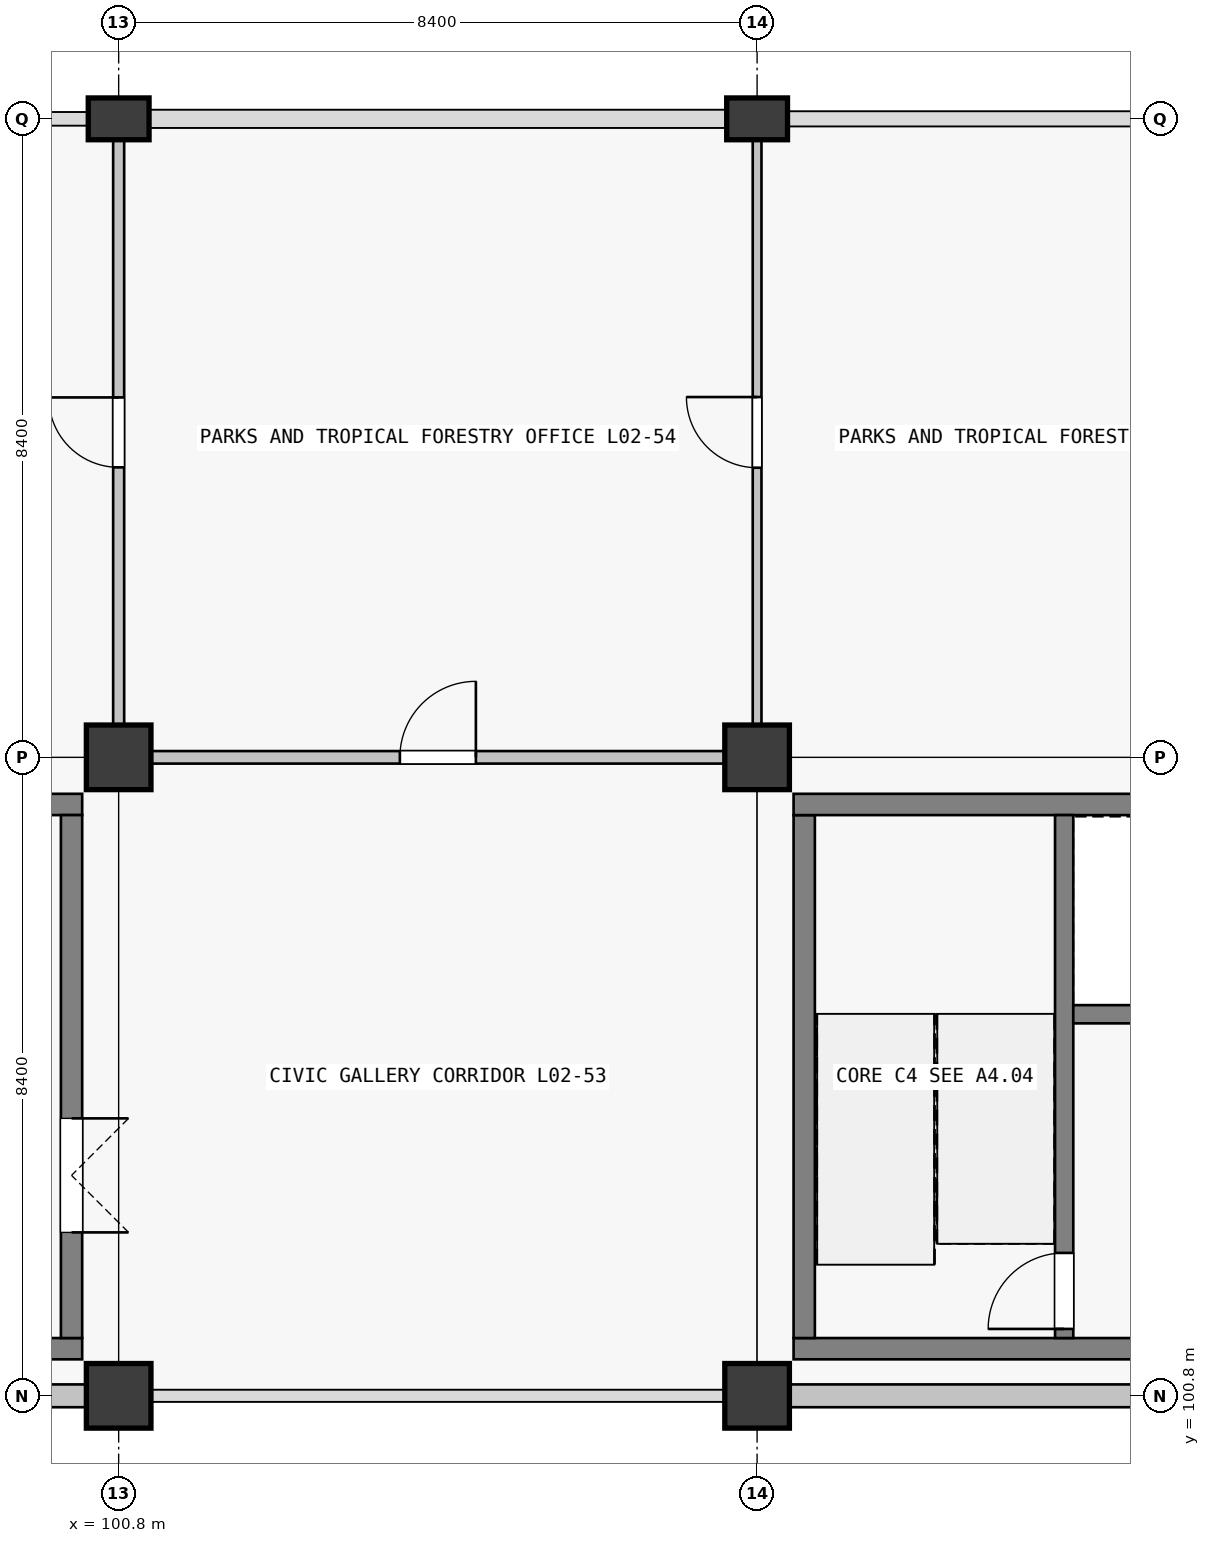
"""IFC4 building model, lengths in metres.
Left out: names, types, materials, properties, quantities, classifications, styles, units other than length and angle.
Written with IfcOpenShell. Run it as: python <this file> out.ifc"""

import sys

from ifc_helpers import new_model, si_unit, direction, frame, frame_2d, origin, origin_2d, place, context, subcontext, project, spatial, rectangle, extrude, element, fill, save


model = new_model("IFC4")
c1 = context("Model", 3, precision=1e-05, world=origin(), true_north=direction((0.0, 1.0)))
c2 = subcontext(c1, "Body", "Model", "MODEL_VIEW")
j1 = project(units=[si_unit("LENGTHUNIT", "METRE"), si_unit("PLANEANGLEUNIT", "RADIAN")], contexts=[c1])
p1 = place(None, origin())
s1 = spatial("IfcSite", under=j1, at=p1, CompositionType="ELEMENT")
p2 = place(p1, origin())
s2 = spatial("IfcBuilding", under=s1, at=p2, CompositionType="ELEMENT")
p3 = place(p2, frame((0.0, 0.0, 10.26)))
s3 = spatial("IfcBuildingStorey", under=s2, at=p3, CompositionType="ELEMENT", Elevation=10.26)
for number, where, z_axis, x_axis in (
    (1, (100.8, 100.8, 0.0), (0.0, 0.0, 1.0), (1.0, 0.0, 0.0)),
    (2, (100.8, 109.2, 0.0), (0.0, 0.0, 1.0), (1.0, 0.0, 0.0)),
):
    element("IfcColumn", number, at=place(p3, frame(where, z_axis=z_axis, x_axis=x_axis)), inside=s3, PredefinedType="COLUMN", context=c2, shape_type="SweptSolid", body=[
        extrude(rectangle(XDim=0.85, YDim=0.85, at=origin_2d()), origin(), (0.0, 0.0, 1.0), 4.5),
    ])
p4 = place(p3, frame((100.8, 117.6, 0.0), z_axis=(0.0, 0.0, 1.0), x_axis=(1.0, 0.0, 0.0)))
e3 = element("IfcColumn", 3, at=p4, inside=s3, PredefinedType="COLUMN", context=c2, shape_type="SweptSolid", body=[
    extrude(rectangle(XDim=0.8, YDim=0.55, at=origin_2d()), origin(), (0.0, 0.0, 1.0), 4.5),
])
for number, where, z_axis, x_axis in (
    (4, (109.2, 100.8, 0.0), (0.0, 0.0, 1.0), (1.0, 0.0, 0.0)),
    (5, (109.2, 109.2, 0.0), (0.0, 0.0, 1.0), (1.0, 0.0, 0.0)),
):
    element("IfcColumn", number, at=place(p3, frame(where, z_axis=z_axis, x_axis=x_axis)), inside=s3, PredefinedType="COLUMN", context=c2, shape_type="SweptSolid", body=[
        extrude(rectangle(XDim=0.85, YDim=0.85, at=origin_2d()), origin(), (0.0, 0.0, 1.0), 4.5),
    ])
p5 = place(p3, frame((109.2, 117.6, 0.0), z_axis=(0.0, 0.0, 1.0), x_axis=(1.0, 0.0, 0.0)))
e6 = element("IfcColumn", 6, at=p5, inside=s3, PredefinedType="COLUMN", context=c2, shape_type="SweptSolid", body=[
    extrude(rectangle(XDim=0.8, YDim=0.55, at=origin_2d()), origin(), (0.0, 0.0, 1.0), 4.5),
])
for number, where, z_axis, x_axis in (
    (7, (100.374, 100.8, 0.0), (0.0, 0.0, 1.0), (-1.0, 0.0, 0.0)),
    (8, (117.174, 100.8, 0.0), (0.0, 0.0, 1.0), (-1.0, 0.0, 0.0)),
):
    element("IfcWall", number, at=place(p3, frame(where, z_axis=z_axis, x_axis=x_axis)), inside=s3, PredefinedType="SOLIDWALL", context=c2, shape_type="SweptSolid", body=[
        extrude(rectangle(XDim=7.548, YDim=0.3, at=frame_2d((3.774, 0.0))), origin(), (0.0, 0.0, 1.0), 3.54),
    ])
p6 = place(p3, frame((117.12, 101.42, 0.0), z_axis=(0.0, 0.0, 1.0), x_axis=(-1.0, 0.0, 0.0)))
e9 = element("IfcWall", 9, at=p6, inside=s3, PredefinedType="SHEAR", context=c2, shape_type="SweptSolid", body=[
    extrude(rectangle(XDim=7.44, YDim=0.28, at=frame_2d((3.72, 0.0))), origin(), (0.0, 0.0, 1.0), 4.5),
])
p7 = place(p3, frame((109.82, 101.56, 0.0), z_axis=(0.0, 0.0, 1.0), x_axis=(0.0, 1.0, 0.0)))
e10 = element("IfcWall", 10, at=p7, inside=s3, PredefinedType="SHEAR", context=c2, shape_type="SweptSolid", body=[
    extrude(rectangle(XDim=6.88, YDim=0.28, at=frame_2d((3.44, 0.0))), origin(), (0.0, 0.0, 1.0), 4.5),
])
p8 = place(p3, frame((109.68, 108.58, 0.0), z_axis=(0.0, 0.0, 1.0), x_axis=(1.0, 0.0, 0.0)))
e11 = element("IfcWall", 11, at=p8, inside=s3, PredefinedType="SHEAR", context=c2, shape_type="SweptSolid", body=[
    extrude(rectangle(XDim=7.44, YDim=0.28, at=frame_2d((3.72, 0.0))), origin(), (0.0, 0.0, 1.0), 4.5),
])
p9 = place(p3, frame((113.24, 101.56, 0.0), z_axis=(0.0, 0.0, 1.0), x_axis=(0.0, 1.0, 0.0)))
e12 = element("IfcWall", 12, at=p9, inside=s3, PredefinedType="SHEAR", context=c2, shape_type="SweptSolid", body=[
    extrude(rectangle(XDim=6.88, YDim=0.24, at=frame_2d((3.44, 0.0))), origin(), (0.0, 0.0, 1.0), 4.5),
])
p10 = place(p9, frame((0.12, 0.0, 0.0)))
e13 = element("IfcOpeningElement", 13, at=p10, cuts=e12, PredefinedType="OPENING", context=c2, shape_type="SweptSolid", body=[
    extrude(rectangle(XDim=1.0, YDim=2.15, at=frame_2d((0.5, 1.075))), frame((0.0, 0.12, 0.0), z_axis=(0.0, -1.0, 0.0), x_axis=(1.0, 0.0, 0.0)), (0.0, 0.0, 1.0), 0.24),
])
p11 = place(p3, frame((113.36, 105.82, 0.0), z_axis=(0.0, 0.0, 1.0), x_axis=(1.0, 0.0, 0.0)))
e14 = element("IfcWall", 14, at=p11, inside=s3, PredefinedType="SHEAR", context=c2, shape_type="SweptSolid", body=[
    extrude(rectangle(XDim=3.48, YDim=0.24, at=frame_2d((1.74, 0.0))), origin(), (0.0, 0.0, 1.0), 4.5),
])
p12 = place(p11, frame((1.14, 0.0, 0.0)))
e15 = element("IfcOpeningElement", 15, at=p12, cuts=e14, PredefinedType="OPENING", context=c2, shape_type="SweptSolid", body=[
    extrude(rectangle(XDim=1.2, YDim=2.2, at=frame_2d((0.6, 1.1))), frame((0.0, 0.12, 0.0), z_axis=(0.0, -1.0, 0.0), x_axis=(1.0, 0.0, 0.0)), (0.0, 0.0, 1.0), 0.24),
])
for number, where, z_axis, x_axis in (
    (16, (100.32, 101.42, 0.0), (0.0, 0.0, 1.0), (-1.0, 0.0, 0.0)),
    (17, (92.88, 108.58, 0.0), (0.0, 0.0, 1.0), (1.0, 0.0, 0.0)),
):
    element("IfcWall", number, at=place(p3, frame(where, z_axis=z_axis, x_axis=x_axis)), inside=s3, PredefinedType="SHEAR", context=c2, shape_type="SweptSolid", body=[
        extrude(rectangle(XDim=7.44, YDim=0.28, at=frame_2d((3.72, 0.0))), origin(), (0.0, 0.0, 1.0), 4.5),
    ])
p13 = place(p3, frame((100.18, 108.44, 0.0), z_axis=(0.0, 0.0, 1.0), x_axis=(0.0, -1.0, 0.0)))
e18 = element("IfcWall", 18, at=p13, inside=s3, PredefinedType="SHEAR", context=c2, shape_type="SweptSolid", body=[
    extrude(rectangle(XDim=6.88, YDim=0.28, at=frame_2d((3.44, 0.0))), origin(), (0.0, 0.0, 1.0), 4.5),
])
p14 = place(p13, frame((3.99, 0.0, 0.0)))
e19 = element("IfcOpeningElement", 19, at=p14, cuts=e18, PredefinedType="OPENING", context=c2, shape_type="SweptSolid", body=[
    extrude(rectangle(XDim=1.5, YDim=2.15, at=frame_2d((0.75, 1.075))), frame((0.0, 0.14, 0.0), z_axis=(0.0, -1.0, 0.0), x_axis=(1.0, 0.0, 0.0)), (0.0, 0.0, 1.0), 0.28),
])
p15 = place(p3, frame((101.227, 109.2, 0.0), z_axis=(0.0, 0.0, 1.0), x_axis=(1.0, 0.0, 0.0)))
e20 = element("IfcWall", 20, at=p15, inside=s3, PredefinedType="PARTITIONING", context=c2, shape_type="SweptSolid", body=[
    extrude(rectangle(XDim=7.546, YDim=0.165, at=frame_2d((3.773, 0.0))), origin(), (0.0, 0.0, 1.0), 3.37),
])
p16 = place(p15, frame((3.273, 0.0, 0.0)))
e21 = element("IfcOpeningElement", 21, at=p16, cuts=e20, PredefinedType="OPENING", context=c2, shape_type="SweptSolid", body=[
    extrude(rectangle(XDim=1.0, YDim=2.2, at=frame_2d((0.5, 1.1))), frame((0.0, 0.083, 0.0), z_axis=(0.0, -1.0, 0.0), x_axis=(1.0, 0.0, 0.0)), (0.0, 0.0, 1.0), 0.165),
])
p17 = place(p3, frame((100.8, 109.627, 0.0), z_axis=(0.0, 0.0, 1.0), x_axis=(0.0, 1.0, 0.0)))
e22 = element("IfcWall", 22, at=p17, inside=s3, PredefinedType="PARTITIONING", context=c2, shape_type="SweptSolid", body=[
    extrude(rectangle(XDim=7.696, YDim=0.145, at=frame_2d((3.848, 0.0))), origin(), (0.0, 0.0, 1.0), 3.37),
])
p18 = place(p17, frame((3.388, 0.0, 0.0)))
e23 = element("IfcOpeningElement", 23, at=p18, cuts=e22, PredefinedType="OPENING", context=c2, shape_type="SweptSolid", body=[
    extrude(rectangle(XDim=0.92, YDim=2.15, at=frame_2d((0.46, 1.075))), frame((0.0, 0.073, 0.0), z_axis=(0.0, -1.0, 0.0), x_axis=(1.0, 0.0, 0.0)), (0.0, 0.0, 1.0), 0.145),
])
p19 = place(p3, frame((109.2, 109.627, 0.0), z_axis=(0.0, 0.0, 1.0), x_axis=(0.0, 1.0, 0.0)))
e24 = element("IfcWall", 24, at=p19, inside=s3, PredefinedType="PARTITIONING", context=c2, shape_type="SweptSolid", body=[
    extrude(rectangle(XDim=7.696, YDim=0.115, at=frame_2d((3.848, 0.0))), origin(), (0.0, 0.0, 1.0), 3.37),
])
p20 = place(p19, frame((3.383, 0.0, 0.0)))
e25 = element("IfcOpeningElement", 25, at=p20, cuts=e24, PredefinedType="OPENING", context=c2, shape_type="SweptSolid", body=[
    extrude(rectangle(XDim=0.93, YDim=2.12, at=frame_2d((0.465, 1.06))), frame((0.0, 0.058, 0.0), z_axis=(0.0, -1.0, 0.0), x_axis=(1.0, 0.0, 0.0)), (0.0, 0.0, 1.0), 0.115),
])
p21 = place(p10, origin())
e26 = element("IfcDoor", 26, at=p21, inside=s3, OperationType="SINGLE_SWING_LEFT", PredefinedType="DOOR", context=c2, shape_type="SweptSolid", body=[
    extrude(rectangle(XDim=1.0, YDim=2.15, at=frame_2d((0.5, 1.075))), frame((0.0, 0.025, 0.0), z_axis=(0.0, -1.0, 0.0), x_axis=(1.0, 0.0, 0.0)), (0.0, 0.0, 1.0), 0.05),
])
fill(e13, e26)
p22 = place(p14, origin())
e27 = element("IfcDoor", 27, at=p22, inside=s3, OperationType="DOUBLE_DOOR_SINGLE_SWING", PredefinedType="DOOR", context=c2, shape_type="SweptSolid", body=[
    extrude(rectangle(XDim=1.5, YDim=2.15, at=frame_2d((0.75, 1.075))), frame((0.0, 0.025, 0.0), z_axis=(0.0, -1.0, 0.0), x_axis=(1.0, 0.0, 0.0)), (0.0, 0.0, 1.0), 0.05),
])
fill(e19, e27)
p23 = place(p16, origin())
e28 = element("IfcDoor", 28, at=p23, inside=s3, OperationType="SINGLE_SWING_RIGHT", PredefinedType="DOOR", context=c2, shape_type="SweptSolid", body=[
    extrude(rectangle(XDim=1.0, YDim=2.2, at=frame_2d((0.5, 1.1))), frame((0.0, 0.025, 0.0), z_axis=(0.0, -1.0, 0.0), x_axis=(1.0, 0.0, 0.0)), (0.0, 0.0, 1.0), 0.05),
])
fill(e21, e28)
p24 = place(p20, origin())
e29 = element("IfcDoor", 29, at=p24, inside=s3, OperationType="SINGLE_SWING_RIGHT", PredefinedType="DOOR", context=c2, shape_type="SweptSolid", body=[
    extrude(rectangle(XDim=0.93, YDim=2.12, at=frame_2d((0.465, 1.06))), frame((0.0, 0.025, 0.0), z_axis=(0.0, -1.0, 0.0), x_axis=(1.0, 0.0, 0.0)), (0.0, 0.0, 1.0), 0.05),
])
fill(e25, e29)
p25 = place(p18, origin())
e30 = element("IfcDoor", 30, at=p25, inside=s3, OperationType="SINGLE_SWING_RIGHT", PredefinedType="DOOR", context=c2, shape_type="SweptSolid", body=[
    extrude(rectangle(XDim=0.92, YDim=2.15, at=frame_2d((0.46, 1.075))), frame((0.0, 0.025, 0.0), z_axis=(0.0, -1.0, 0.0), x_axis=(1.0, 0.0, 0.0)), (0.0, 0.0, 1.0), 0.05),
])
fill(e23, e30)
save(model, sys.argv[1])
